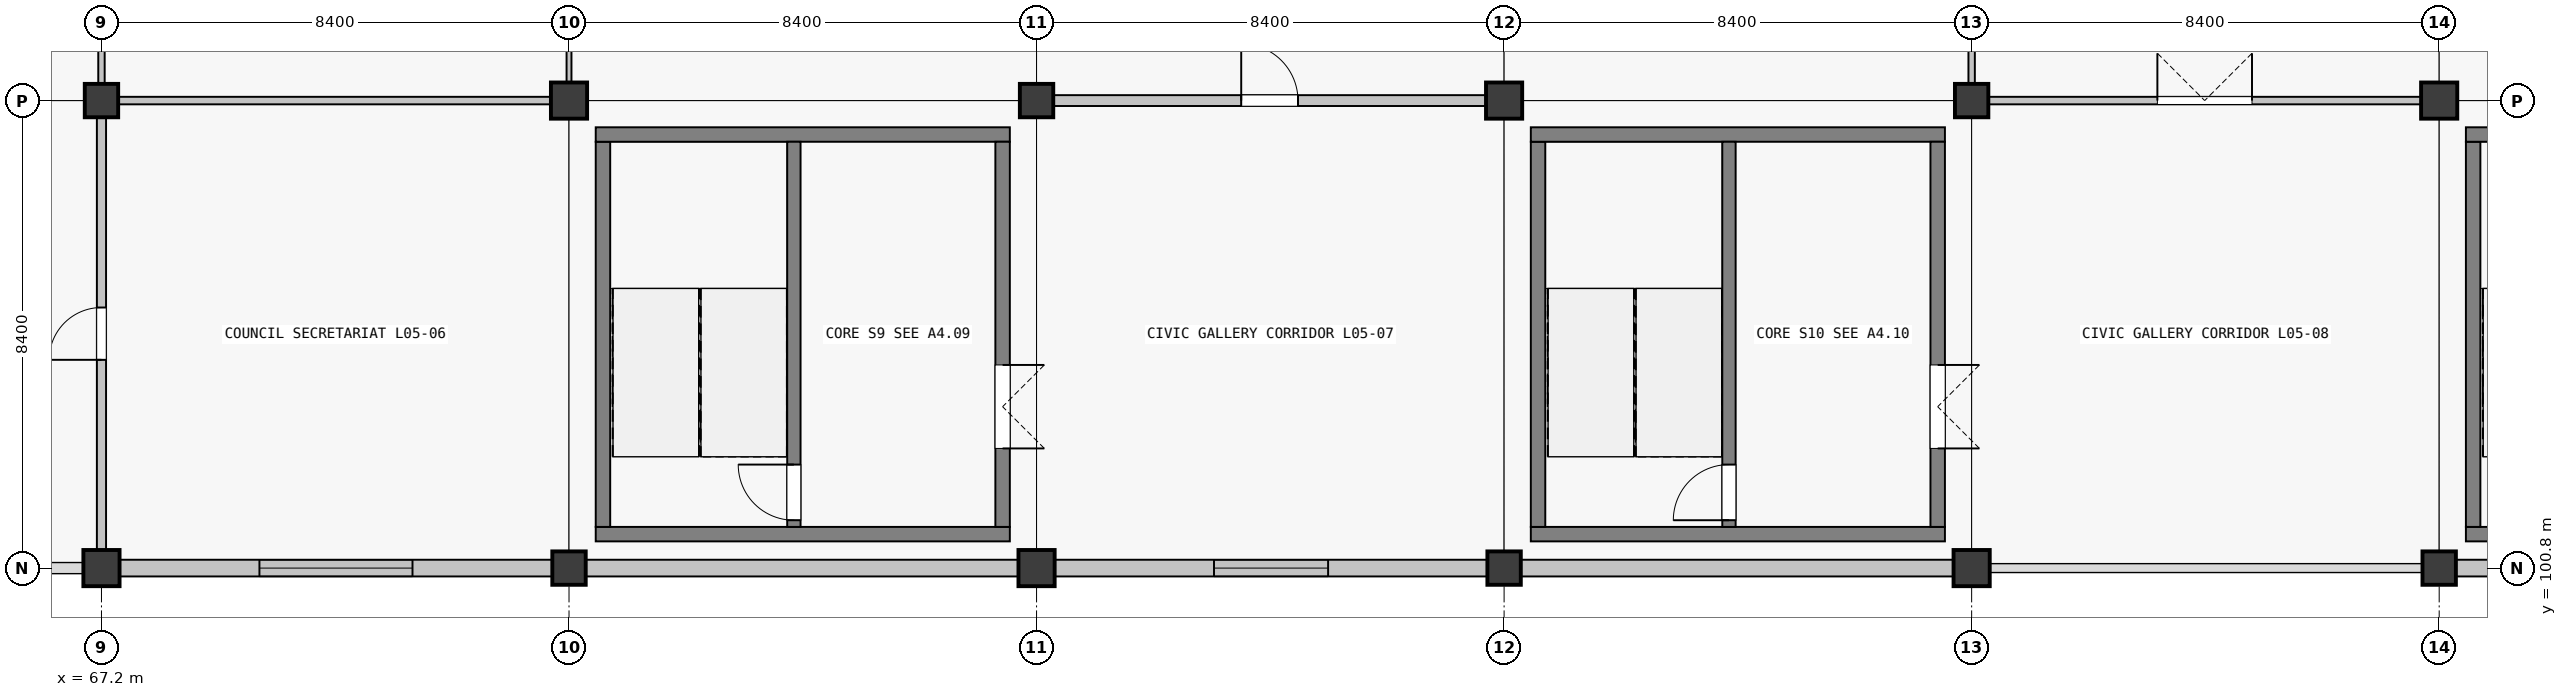
"""IFC4 building model, lengths in metres.
Left out: names, types, materials, properties, quantities, classifications, styles, units other than length and angle.
Written with IfcOpenShell. Run it as: python <this file> out.ifc"""

import sys

from ifc_helpers import new_model, si_unit, direction, frame, frame_2d, origin, origin_2d, place, context, subcontext, project, spatial, rectangle, extrude, element, fill, save


model = new_model("IFC4")
c1 = context("Model", 3, precision=1e-05, world=origin(), true_north=direction((0.0, 1.0)))
c2 = subcontext(c1, "Body", "Model", "MODEL_VIEW")
j1 = project(units=[si_unit("LENGTHUNIT", "METRE"), si_unit("PLANEANGLEUNIT", "RADIAN")], contexts=[c1])
p1 = place(None, origin())
s1 = spatial("IfcSite", under=j1, at=p1, CompositionType="ELEMENT")
p2 = place(p1, origin())
s2 = spatial("IfcBuilding", under=s1, at=p2, CompositionType="ELEMENT")
p3 = place(p2, frame((0.0, 0.0, 23.4)))
s3 = spatial("IfcBuildingStorey", under=s2, at=p3, CompositionType="ELEMENT", Elevation=23.4)
p4 = place(p3, frame((67.2, 100.8, 0.0), z_axis=(0.0, 0.0, 1.0), x_axis=(1.0, 0.0, 0.0)))
e1 = element("IfcColumn", 1, at=p4, inside=s3, PredefinedType="COLUMN", context=c2, shape_type="SweptSolid", body=[
    extrude(rectangle(XDim=0.65, YDim=0.65, at=origin_2d()), origin(), (0.0, 0.0, 1.0), 4.32),
])
for number, where, z_axis, x_axis in (
    (2, (67.2, 109.2, 0.0), (0.0, 0.0, 1.0), (1.0, 0.0, 0.0)),
    (3, (75.6, 100.8, 0.0), (0.0, 0.0, 1.0), (1.0, 0.0, 0.0)),
):
    element("IfcColumn", number, at=place(p3, frame(where, z_axis=z_axis, x_axis=x_axis)), inside=s3, PredefinedType="COLUMN", context=c2, shape_type="SweptSolid", body=[
        extrude(rectangle(XDim=0.6, YDim=0.6, at=origin_2d()), origin(), (0.0, 0.0, 1.0), 4.32),
    ])
for number, where, z_axis, x_axis in (
    (4, (75.6, 109.2, 0.0), (0.0, 0.0, 1.0), (1.0, 0.0, 0.0)),
    (5, (84.0, 100.8, 0.0), (0.0, 0.0, 1.0), (1.0, 0.0, 0.0)),
):
    element("IfcColumn", number, at=place(p3, frame(where, z_axis=z_axis, x_axis=x_axis)), inside=s3, PredefinedType="COLUMN", context=c2, shape_type="SweptSolid", body=[
        extrude(rectangle(XDim=0.65, YDim=0.65, at=origin_2d()), origin(), (0.0, 0.0, 1.0), 4.32),
    ])
for number, where, z_axis, x_axis in (
    (6, (84.0, 109.2, 0.0), (0.0, 0.0, 1.0), (1.0, 0.0, 0.0)),
    (7, (92.4, 100.8, 0.0), (0.0, 0.0, 1.0), (1.0, 0.0, 0.0)),
):
    element("IfcColumn", number, at=place(p3, frame(where, z_axis=z_axis, x_axis=x_axis)), inside=s3, PredefinedType="COLUMN", context=c2, shape_type="SweptSolid", body=[
        extrude(rectangle(XDim=0.6, YDim=0.6, at=origin_2d()), origin(), (0.0, 0.0, 1.0), 4.32),
    ])
for number, where, z_axis, x_axis in (
    (8, (92.4, 109.2, 0.0), (0.0, 0.0, 1.0), (1.0, 0.0, 0.0)),
    (9, (100.8, 100.8, 0.0), (0.0, 0.0, 1.0), (1.0, 0.0, 0.0)),
):
    element("IfcColumn", number, at=place(p3, frame(where, z_axis=z_axis, x_axis=x_axis)), inside=s3, PredefinedType="COLUMN", context=c2, shape_type="SweptSolid", body=[
        extrude(rectangle(XDim=0.65, YDim=0.65, at=origin_2d()), origin(), (0.0, 0.0, 1.0), 4.32),
    ])
for number, where, z_axis, x_axis in (
    (10, (100.8, 109.2, 0.0), (0.0, 0.0, 1.0), (1.0, 0.0, 0.0)),
    (11, (109.2, 100.8, 0.0), (0.0, 0.0, 1.0), (1.0, 0.0, 0.0)),
):
    element("IfcColumn", number, at=place(p3, frame(where, z_axis=z_axis, x_axis=x_axis)), inside=s3, PredefinedType="COLUMN", context=c2, shape_type="SweptSolid", body=[
        extrude(rectangle(XDim=0.6, YDim=0.6, at=origin_2d()), origin(), (0.0, 0.0, 1.0), 4.32),
    ])
p5 = place(p3, frame((109.2, 109.2, 0.0), z_axis=(0.0, 0.0, 1.0), x_axis=(1.0, 0.0, 0.0)))
e12 = element("IfcColumn", 12, at=p5, inside=s3, PredefinedType="COLUMN", context=c2, shape_type="SweptSolid", body=[
    extrude(rectangle(XDim=0.65, YDim=0.65, at=origin_2d()), origin(), (0.0, 0.0, 1.0), 4.32),
])
p6 = place(p3, frame((75.299, 100.8, 0.0), z_axis=(0.0, 0.0, 1.0), x_axis=(-1.0, 0.0, 0.0)))
e13 = element("IfcWall", 13, at=p6, inside=s3, PredefinedType="SOLIDWALL", context=c2, shape_type="SweptSolid", body=[
    extrude(rectangle(XDim=7.773, YDim=0.3, at=frame_2d((3.887, 0.0))), origin(), (0.0, 0.0, 1.0), 3.37),
])
p7 = place(p6, frame((2.511, 0.0, 0.9)))
e14 = element("IfcOpeningElement", 14, at=p7, cuts=e13, PredefinedType="OPENING", context=c2, shape_type="SweptSolid", body=[
    extrude(rectangle(XDim=2.75, YDim=1.6, at=frame_2d((1.375, 0.8))), frame((0.0, 0.15, 0.0), z_axis=(0.0, -1.0, 0.0), x_axis=(1.0, 0.0, 0.0)), (0.0, 0.0, 1.0), 0.3),
])
p8 = place(p3, frame((83.674, 100.8, 0.0), z_axis=(0.0, 0.0, 1.0), x_axis=(-1.0, 0.0, 0.0)))
e15 = element("IfcWall", 15, at=p8, inside=s3, PredefinedType="SOLIDWALL", context=c2, shape_type="SweptSolid", body=[
    extrude(rectangle(XDim=7.773, YDim=0.3, at=frame_2d((3.887, 0.0))), origin(), (0.0, 0.0, 1.0), 3.37),
])
p9 = place(p3, frame((92.099, 100.8, 0.0), z_axis=(0.0, 0.0, 1.0), x_axis=(-1.0, 0.0, 0.0)))
e16 = element("IfcWall", 16, at=p9, inside=s3, PredefinedType="SOLIDWALL", context=c2, shape_type="SweptSolid", body=[
    extrude(rectangle(XDim=7.773, YDim=0.3, at=frame_2d((3.887, 0.0))), origin(), (0.0, 0.0, 1.0), 3.37),
])
p10 = place(p9, frame((2.861, 0.0, 0.9)))
e17 = element("IfcOpeningElement", 17, at=p10, cuts=e16, PredefinedType="OPENING", context=c2, shape_type="SweptSolid", body=[
    extrude(rectangle(XDim=2.05, YDim=1.45, at=frame_2d((1.025, 0.725))), frame((0.0, 0.15, 0.0), z_axis=(0.0, -1.0, 0.0), x_axis=(1.0, 0.0, 0.0)), (0.0, 0.0, 1.0), 0.3),
])
p11 = place(p3, frame((100.474, 100.8, 0.0), z_axis=(0.0, 0.0, 1.0), x_axis=(-1.0, 0.0, 0.0)))
e18 = element("IfcWall", 18, at=p11, inside=s3, PredefinedType="SOLIDWALL", context=c2, shape_type="SweptSolid", body=[
    extrude(rectangle(XDim=7.773, YDim=0.3, at=frame_2d((3.887, 0.0))), origin(), (0.0, 0.0, 1.0), 3.37),
])
p12 = place(p3, frame((117.274, 100.8, 0.0), z_axis=(0.0, 0.0, 1.0), x_axis=(-1.0, 0.0, 0.0)))
e19 = element("IfcWall", 19, at=p12, inside=s3, PredefinedType="SOLIDWALL", context=c2, shape_type="SweptSolid", body=[
    extrude(rectangle(XDim=7.773, YDim=0.3, at=frame_2d((3.886, 0.0))), origin(), (0.0, 0.0, 1.0), 3.37),
])
p13 = place(p3, frame((117.12, 101.41, 0.0), z_axis=(0.0, 0.0, 1.0), x_axis=(-1.0, 0.0, 0.0)))
e20 = element("IfcWall", 20, at=p13, inside=s3, PredefinedType="SHEAR", context=c2, shape_type="SweptSolid", body=[
    extrude(rectangle(XDim=7.44, YDim=0.26, at=frame_2d((3.72, 0.0))), origin(), (0.0, 0.0, 1.0), 4.32),
])
p14 = place(p3, frame((109.81, 101.54, 0.0), z_axis=(0.0, 0.0, 1.0), x_axis=(0.0, 1.0, 0.0)))
e21 = element("IfcWall", 21, at=p14, inside=s3, PredefinedType="SHEAR", context=c2, shape_type="SweptSolid", body=[
    extrude(rectangle(XDim=6.92, YDim=0.26, at=frame_2d((3.46, 0.0))), origin(), (0.0, 0.0, 1.0), 4.32),
])
p15 = place(p3, frame((109.68, 108.59, 0.0), z_axis=(0.0, 0.0, 1.0), x_axis=(1.0, 0.0, 0.0)))
e22 = element("IfcWall", 22, at=p15, inside=s3, PredefinedType="SHEAR", context=c2, shape_type="SweptSolid", body=[
    extrude(rectangle(XDim=7.44, YDim=0.26, at=frame_2d((3.72, 0.0))), origin(), (0.0, 0.0, 1.0), 4.32),
])
p16 = place(p3, frame((83.52, 101.41, 0.0), z_axis=(0.0, 0.0, 1.0), x_axis=(-1.0, 0.0, 0.0)))
e23 = element("IfcWall", 23, at=p16, inside=s3, PredefinedType="SHEAR", context=c2, shape_type="SweptSolid", body=[
    extrude(rectangle(XDim=7.44, YDim=0.26, at=frame_2d((3.72, 0.0))), origin(), (0.0, 0.0, 1.0), 4.32),
])
p17 = place(p3, frame((76.21, 101.54, 0.0), z_axis=(0.0, 0.0, 1.0), x_axis=(0.0, 1.0, 0.0)))
e24 = element("IfcWall", 24, at=p17, inside=s3, PredefinedType="SHEAR", context=c2, shape_type="SweptSolid", body=[
    extrude(rectangle(XDim=6.92, YDim=0.26, at=frame_2d((3.46, 0.0))), origin(), (0.0, 0.0, 1.0), 4.32),
])
p18 = place(p3, frame((76.08, 108.59, 0.0), z_axis=(0.0, 0.0, 1.0), x_axis=(1.0, 0.0, 0.0)))
e25 = element("IfcWall", 25, at=p18, inside=s3, PredefinedType="SHEAR", context=c2, shape_type="SweptSolid", body=[
    extrude(rectangle(XDim=7.44, YDim=0.26, at=frame_2d((3.72, 0.0))), origin(), (0.0, 0.0, 1.0), 4.32),
])
p19 = place(p3, frame((83.39, 108.46, 0.0), z_axis=(0.0, 0.0, 1.0), x_axis=(0.0, -1.0, 0.0)))
e26 = element("IfcWall", 26, at=p19, inside=s3, PredefinedType="SHEAR", context=c2, shape_type="SweptSolid", body=[
    extrude(rectangle(XDim=6.92, YDim=0.26, at=frame_2d((3.46, 0.0))), origin(), (0.0, 0.0, 1.0), 4.32),
])
p20 = place(p19, frame((4.01, 0.0, 0.0)))
e27 = element("IfcOpeningElement", 27, at=p20, cuts=e26, PredefinedType="OPENING", context=c2, shape_type="SweptSolid", body=[
    extrude(rectangle(XDim=1.5, YDim=2.15, at=frame_2d((0.75, 1.075))), frame((0.0, 0.13, 0.0), z_axis=(0.0, -1.0, 0.0), x_axis=(1.0, 0.0, 0.0)), (0.0, 0.0, 1.0), 0.26),
])
p21 = place(p3, frame((79.64, 101.54, 0.0), z_axis=(0.0, 0.0, 1.0), x_axis=(0.0, 1.0, 0.0)))
e28 = element("IfcWall", 28, at=p21, inside=s3, PredefinedType="SHEAR", context=c2, shape_type="SweptSolid", body=[
    extrude(rectangle(XDim=6.92, YDim=0.24, at=frame_2d((3.46, 0.0))), origin(), (0.0, 0.0, 1.0), 4.32),
])
p22 = place(p21, frame((0.12, 0.0, 0.0)))
e29 = element("IfcOpeningElement", 29, at=p22, cuts=e28, PredefinedType="OPENING", context=c2, shape_type="SweptSolid", body=[
    extrude(rectangle(XDim=1.0, YDim=2.15, at=frame_2d((0.5, 1.075))), frame((0.0, 0.12, 0.0), z_axis=(0.0, -1.0, 0.0), x_axis=(1.0, 0.0, 0.0)), (0.0, 0.0, 1.0), 0.24),
])
p23 = place(p3, frame((100.32, 101.41, 0.0), z_axis=(0.0, 0.0, 1.0), x_axis=(-1.0, 0.0, 0.0)))
e30 = element("IfcWall", 30, at=p23, inside=s3, PredefinedType="SHEAR", context=c2, shape_type="SweptSolid", body=[
    extrude(rectangle(XDim=7.44, YDim=0.26, at=frame_2d((3.72, 0.0))), origin(), (0.0, 0.0, 1.0), 4.32),
])
p24 = place(p3, frame((93.01, 101.54, 0.0), z_axis=(0.0, 0.0, 1.0), x_axis=(0.0, 1.0, 0.0)))
e31 = element("IfcWall", 31, at=p24, inside=s3, PredefinedType="SHEAR", context=c2, shape_type="SweptSolid", body=[
    extrude(rectangle(XDim=6.92, YDim=0.26, at=frame_2d((3.46, 0.0))), origin(), (0.0, 0.0, 1.0), 4.32),
])
p25 = place(p3, frame((92.88, 108.59, 0.0), z_axis=(0.0, 0.0, 1.0), x_axis=(1.0, 0.0, 0.0)))
e32 = element("IfcWall", 32, at=p25, inside=s3, PredefinedType="SHEAR", context=c2, shape_type="SweptSolid", body=[
    extrude(rectangle(XDim=7.44, YDim=0.26, at=frame_2d((3.72, 0.0))), origin(), (0.0, 0.0, 1.0), 4.32),
])
p26 = place(p3, frame((100.19, 108.46, 0.0), z_axis=(0.0, 0.0, 1.0), x_axis=(0.0, -1.0, 0.0)))
e33 = element("IfcWall", 33, at=p26, inside=s3, PredefinedType="SHEAR", context=c2, shape_type="SweptSolid", body=[
    extrude(rectangle(XDim=6.92, YDim=0.26, at=frame_2d((3.46, 0.0))), origin(), (0.0, 0.0, 1.0), 4.32),
])
p27 = place(p26, frame((4.01, 0.0, 0.0)))
e34 = element("IfcOpeningElement", 34, at=p27, cuts=e33, PredefinedType="OPENING", context=c2, shape_type="SweptSolid", body=[
    extrude(rectangle(XDim=1.5, YDim=2.15, at=frame_2d((0.75, 1.075))), frame((0.0, 0.13, 0.0), z_axis=(0.0, -1.0, 0.0), x_axis=(1.0, 0.0, 0.0)), (0.0, 0.0, 1.0), 0.26),
])
p28 = place(p3, frame((96.44, 101.54, 0.0), z_axis=(0.0, 0.0, 1.0), x_axis=(0.0, 1.0, 0.0)))
e35 = element("IfcWall", 35, at=p28, inside=s3, PredefinedType="SHEAR", context=c2, shape_type="SweptSolid", body=[
    extrude(rectangle(XDim=6.92, YDim=0.24, at=frame_2d((3.46, 0.0))), origin(), (0.0, 0.0, 1.0), 4.32),
])
p29 = place(p28, frame((0.12, 0.0, 0.0)))
e36 = element("IfcOpeningElement", 36, at=p29, cuts=e35, PredefinedType="OPENING", context=c2, shape_type="SweptSolid", body=[
    extrude(rectangle(XDim=1.0, YDim=2.15, at=frame_2d((0.5, 1.075))), frame((0.0, 0.12, 0.0), z_axis=(0.0, -1.0, 0.0), x_axis=(1.0, 0.0, 0.0)), (0.0, 0.0, 1.0), 0.24),
])
p30 = place(p3, frame((67.502, 109.2, 0.0), z_axis=(0.0, 0.0, 1.0), x_axis=(1.0, 0.0, 0.0)))
e37 = element("IfcWall", 37, at=p30, inside=s3, PredefinedType="PARTITIONING", context=c2, shape_type="SweptSolid", body=[
    extrude(rectangle(XDim=7.771, YDim=0.135, at=frame_2d((3.885, 0.0))), origin(), (0.0, 0.0, 1.0), 3.19),
])
p31 = place(p3, frame((84.302, 109.2, 0.0), z_axis=(0.0, 0.0, 1.0), x_axis=(1.0, 0.0, 0.0)))
e38 = element("IfcWall", 38, at=p31, inside=s3, PredefinedType="PARTITIONING", context=c2, shape_type="SweptSolid", body=[
    extrude(rectangle(XDim=7.771, YDim=0.195, at=frame_2d((3.885, 0.0))), origin(), (0.0, 0.0, 1.0), 3.19),
])
p32 = place(p31, frame((3.375, 0.0, 0.0)))
e39 = element("IfcOpeningElement", 39, at=p32, cuts=e38, PredefinedType="OPENING", context=c2, shape_type="SweptSolid", body=[
    extrude(rectangle(XDim=1.02, YDim=2.2, at=frame_2d((0.51, 1.1))), frame((0.0, 0.098, 0.0), z_axis=(0.0, -1.0, 0.0), x_axis=(1.0, 0.0, 0.0)), (0.0, 0.0, 1.0), 0.195),
])
p33 = place(p3, frame((101.102, 109.2, 0.0), z_axis=(0.0, 0.0, 1.0), x_axis=(1.0, 0.0, 0.0)))
e40 = element("IfcWall", 40, at=p33, inside=s3, PredefinedType="PARTITIONING", context=c2, shape_type="SweptSolid", body=[
    extrude(rectangle(XDim=7.771, YDim=0.135, at=frame_2d((3.885, 0.0))), origin(), (0.0, 0.0, 1.0), 3.19),
])
p34 = place(p33, frame((3.035, 0.0, 0.0)))
e41 = element("IfcOpeningElement", 41, at=p34, cuts=e40, PredefinedType="OPENING", context=c2, shape_type="SweptSolid", body=[
    extrude(rectangle(XDim=1.7, YDim=2.35, at=frame_2d((0.85, 1.175))), frame((0.0, 0.067, 0.0), z_axis=(0.0, -1.0, 0.0), x_axis=(1.0, 0.0, 0.0)), (0.0, 0.0, 1.0), 0.135),
])
p35 = place(p3, frame((67.2, 101.127, 0.0), z_axis=(0.0, 0.0, 1.0), x_axis=(0.0, 1.0, 0.0)))
e42 = element("IfcWall", 42, at=p35, inside=s3, PredefinedType="PARTITIONING", context=c2, shape_type="SweptSolid", body=[
    extrude(rectangle(XDim=7.771, YDim=0.165, at=frame_2d((3.885, 0.0))), origin(), (0.0, 0.0, 1.0), 3.19),
])
p36 = place(p35, frame((3.415, 0.0, 0.0)))
e43 = element("IfcOpeningElement", 43, at=p36, cuts=e42, PredefinedType="OPENING", context=c2, shape_type="SweptSolid", body=[
    extrude(rectangle(XDim=0.94, YDim=2.15, at=frame_2d((0.47, 1.075))), frame((0.0, 0.083, 0.0), z_axis=(0.0, -1.0, 0.0), x_axis=(1.0, 0.0, 0.0)), (0.0, 0.0, 1.0), 0.165),
])
p37 = place(p3, frame((67.2, 109.502, 0.0), z_axis=(0.0, 0.0, 1.0), x_axis=(0.0, 1.0, 0.0)))
e44 = element("IfcWall", 44, at=p37, inside=s3, PredefinedType="PARTITIONING", context=c2, shape_type="SweptSolid", body=[
    extrude(rectangle(XDim=7.821, YDim=0.115, at=frame_2d((3.911, 0.0))), origin(), (0.0, 0.0, 1.0), 3.19),
])
p38 = place(p37, frame((0.693, 0.0, 0.0)))
e45 = element("IfcOpeningElement", 45, at=p38, cuts=e44, PredefinedType="OPENING", context=c2, shape_type="SweptSolid", body=[
    extrude(rectangle(XDim=0.94, YDim=2.08, at=frame_2d((0.47, 1.04))), frame((0.0, 0.058, 0.0), z_axis=(0.0, -1.0, 0.0), x_axis=(1.0, 0.0, 0.0)), (0.0, 0.0, 1.0), 0.115),
])
p39 = place(p37, frame((4.603, 0.0, 0.0)))
e46 = element("IfcOpeningElement", 46, at=p39, cuts=e44, PredefinedType="OPENING", context=c2, shape_type="SweptSolid", body=[
    extrude(rectangle(XDim=0.96, YDim=2.1, at=frame_2d((0.48, 1.05))), frame((0.0, 0.058, 0.0), z_axis=(0.0, -1.0, 0.0), x_axis=(1.0, 0.0, 0.0)), (0.0, 0.0, 1.0), 0.115),
])
p40 = place(p3, frame((75.6, 109.527, 0.0), z_axis=(0.0, 0.0, 1.0), x_axis=(0.0, 1.0, 0.0)))
e47 = element("IfcWall", 47, at=p40, inside=s3, PredefinedType="PARTITIONING", context=c2, shape_type="SweptSolid", body=[
    extrude(rectangle(XDim=7.796, YDim=0.088, at=frame_2d((3.898, 0.0))), origin(), (0.0, 0.0, 1.0), 3.19),
])
p41 = place(p3, frame((100.8, 109.502, 0.0), z_axis=(0.0, 0.0, 1.0), x_axis=(0.0, 1.0, 0.0)))
e48 = element("IfcWall", 48, at=p41, inside=s3, PredefinedType="PARTITIONING", context=c2, shape_type="SweptSolid", body=[
    extrude(rectangle(XDim=7.821, YDim=0.115, at=frame_2d((3.911, 0.0))), origin(), (0.0, 0.0, 1.0), 3.19),
])
p42 = place(p41, frame((3.21, 0.0, 0.0)))
e49 = element("IfcOpeningElement", 49, at=p42, cuts=e48, PredefinedType="OPENING", context=c2, shape_type="SweptSolid", body=[
    extrude(rectangle(XDim=1.4, YDim=2.25, at=frame_2d((0.7, 1.125))), frame((0.0, 0.058, 0.0), z_axis=(0.0, -1.0, 0.0), x_axis=(1.0, 0.0, 0.0)), (0.0, 0.0, 1.0), 0.115),
])
p43 = place(p7, origin())
e50 = element("IfcWindow", 50, at=p43, inside=s3, PartitioningType="SINGLE_PANEL", PredefinedType="WINDOW", context=c2, shape_type="SweptSolid", body=[
    extrude(rectangle(XDim=2.75, YDim=1.6, at=frame_2d((1.375, 0.8))), frame((0.0, 0.03, 0.0), z_axis=(0.0, -1.0, 0.0), x_axis=(1.0, 0.0, 0.0)), (0.0, 0.0, 1.0), 0.06),
])
fill(e14, e50)
p44 = place(p10, origin())
e51 = element("IfcWindow", 51, at=p44, inside=s3, PartitioningType="SINGLE_PANEL", PredefinedType="WINDOW", context=c2, shape_type="SweptSolid", body=[
    extrude(rectangle(XDim=2.05, YDim=1.45, at=frame_2d((1.025, 0.725))), frame((0.0, 0.03, 0.0), z_axis=(0.0, -1.0, 0.0), x_axis=(1.0, 0.0, 0.0)), (0.0, 0.0, 1.0), 0.06),
])
fill(e17, e51)
p45 = place(p22, origin())
e52 = element("IfcDoor", 52, at=p45, inside=s3, OperationType="SINGLE_SWING_RIGHT", PredefinedType="DOOR", context=c2, shape_type="SweptSolid", body=[
    extrude(rectangle(XDim=1.0, YDim=2.15, at=frame_2d((0.5, 1.075))), frame((0.0, 0.025, 0.0), z_axis=(0.0, -1.0, 0.0), x_axis=(1.0, 0.0, 0.0)), (0.0, 0.0, 1.0), 0.05),
])
fill(e29, e52)
p46 = place(p20, origin())
e53 = element("IfcDoor", 53, at=p46, inside=s3, OperationType="DOUBLE_DOOR_SINGLE_SWING", PredefinedType="DOOR", context=c2, shape_type="SweptSolid", body=[
    extrude(rectangle(XDim=1.5, YDim=2.15, at=frame_2d((0.75, 1.075))), frame((0.0, 0.025, 0.0), z_axis=(0.0, -1.0, 0.0), x_axis=(1.0, 0.0, 0.0)), (0.0, 0.0, 1.0), 0.05),
])
fill(e27, e53)
p47 = place(p29, origin())
e54 = element("IfcDoor", 54, at=p47, inside=s3, OperationType="SINGLE_SWING_LEFT", PredefinedType="DOOR", context=c2, shape_type="SweptSolid", body=[
    extrude(rectangle(XDim=1.0, YDim=2.15, at=frame_2d((0.5, 1.075))), frame((0.0, 0.025, 0.0), z_axis=(0.0, -1.0, 0.0), x_axis=(1.0, 0.0, 0.0)), (0.0, 0.0, 1.0), 0.05),
])
fill(e36, e54)
p48 = place(p27, origin())
e55 = element("IfcDoor", 55, at=p48, inside=s3, OperationType="DOUBLE_DOOR_SINGLE_SWING", PredefinedType="DOOR", context=c2, shape_type="SweptSolid", body=[
    extrude(rectangle(XDim=1.5, YDim=2.15, at=frame_2d((0.75, 1.075))), frame((0.0, 0.025, 0.0), z_axis=(0.0, -1.0, 0.0), x_axis=(1.0, 0.0, 0.0)), (0.0, 0.0, 1.0), 0.05),
])
fill(e34, e55)
p49 = place(p32, origin())
e56 = element("IfcDoor", 56, at=p49, inside=s3, OperationType="SINGLE_SWING_LEFT", PredefinedType="DOOR", context=c2, shape_type="SweptSolid", body=[
    extrude(rectangle(XDim=1.02, YDim=2.2, at=frame_2d((0.51, 1.1))), frame((0.0, 0.025, 0.0), z_axis=(0.0, -1.0, 0.0), x_axis=(1.0, 0.0, 0.0)), (0.0, 0.0, 1.0), 0.05),
])
fill(e39, e56)
p50 = place(p34, origin())
e57 = element("IfcDoor", 57, at=p50, inside=s3, OperationType="DOUBLE_DOOR_SINGLE_SWING", PredefinedType="DOOR", context=c2, shape_type="SweptSolid", body=[
    extrude(rectangle(XDim=1.7, YDim=2.35, at=frame_2d((0.85, 1.175))), frame((0.0, 0.025, 0.0), z_axis=(0.0, -1.0, 0.0), x_axis=(1.0, 0.0, 0.0)), (0.0, 0.0, 1.0), 0.05),
])
fill(e41, e57)
p51 = place(p36, origin())
e58 = element("IfcDoor", 58, at=p51, inside=s3, OperationType="SINGLE_SWING_LEFT", PredefinedType="DOOR", context=c2, shape_type="SweptSolid", body=[
    extrude(rectangle(XDim=0.94, YDim=2.15, at=frame_2d((0.47, 1.075))), frame((0.0, 0.025, 0.0), z_axis=(0.0, -1.0, 0.0), x_axis=(1.0, 0.0, 0.0)), (0.0, 0.0, 1.0), 0.05),
])
fill(e43, e58)
save(model, sys.argv[1])
